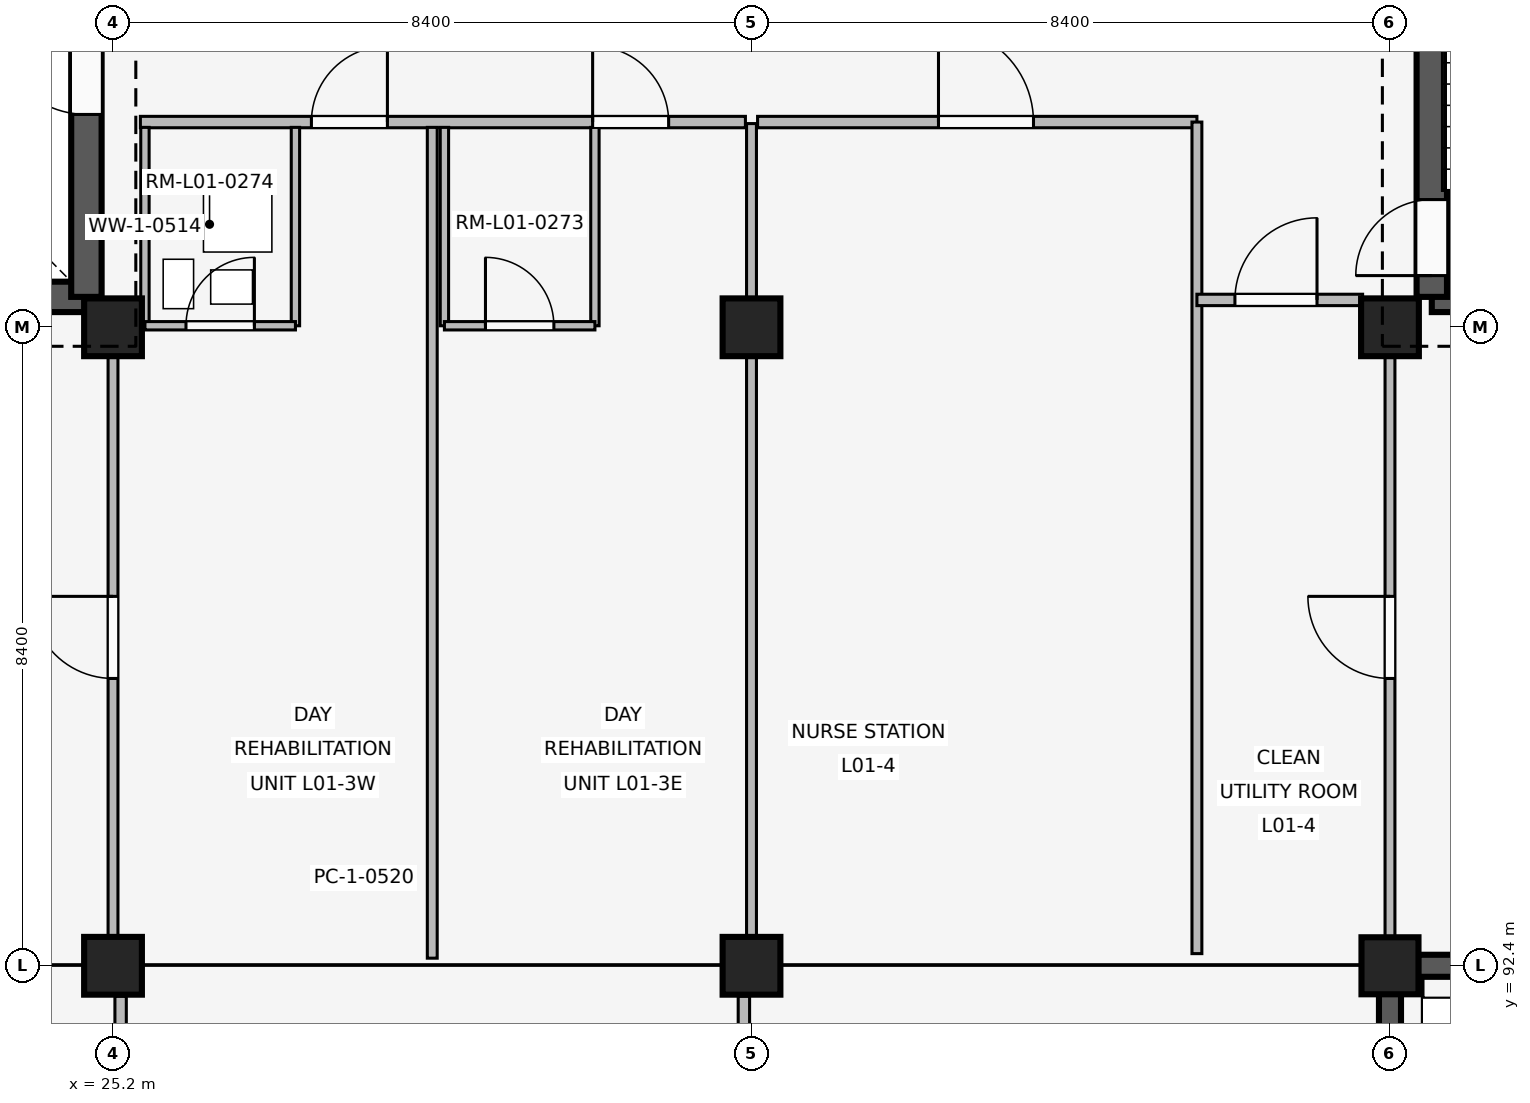
"""IFC4 building model, lengths in metres.
Left out: names, types, materials, properties, quantities, classifications, styles, units other than length and angle.
Written with IfcOpenShell. Run it as: python <this file> out.ifc"""

import sys

from ifc_helpers import new_model, si_unit, direction, frame, frame_2d, origin, origin_2d, place, context, subcontext, project, spatial, rectangle, extrude, element, fill, save


model = new_model("IFC4")
c1 = context("Model", 3, precision=1e-05, world=origin(), true_north=direction((0.0, 1.0)))
c2 = subcontext(c1, "Body", "Model", "MODEL_VIEW")
j1 = project(units=[si_unit("LENGTHUNIT", "METRE"), si_unit("PLANEANGLEUNIT", "RADIAN")], contexts=[c1])
p1 = place(None, origin())
s1 = spatial("IfcSite", under=j1, at=p1, CompositionType="ELEMENT")
p2 = place(p1, origin())
s2 = spatial("IfcBuilding", under=s1, at=p2, CompositionType="ELEMENT")
p3 = place(p2, frame((0.0, 0.0, 4.8)))
s3 = spatial("IfcBuildingStorey", under=s2, at=p3, CompositionType="ELEMENT", Elevation=4.8)
for number, where, z_axis, x_axis in (
    (1, (25.2, 92.4, 0.0), (0.0, 0.0, 1.0), (1.0, 0.0, 0.0)),
    (2, (25.2, 100.8, 0.0), (0.0, 0.0, 1.0), (1.0, 0.0, 0.0)),
    (3, (33.6, 92.4, 0.0), (0.0, 0.0, 1.0), (1.0, 0.0, 0.0)),
    (4, (33.6, 100.8, 0.0), (0.0, 0.0, 1.0), (1.0, 0.0, 0.0)),
):
    element("IfcColumn", number, at=place(p3, frame(where, z_axis=z_axis, x_axis=x_axis)), inside=s3, PredefinedType="COLUMN", context=c2, shape_type="SweptSolid", body=[
        extrude(rectangle(XDim=0.76, YDim=0.76, at=origin_2d()), origin(), (0.0, 0.0, 1.0), 3.3),
    ])
p4 = place(p3, frame((42.0, 92.4, 0.0), z_axis=(0.0, 0.0, 1.0), x_axis=(1.0, 0.0, 0.0)))
e5 = element("IfcColumn", 5, at=p4, inside=s3, PredefinedType="COLUMN", context=c2, shape_type="SweptSolid", body=[
    extrude(rectangle(XDim=0.75, YDim=0.75, at=origin_2d()), origin(), (0.0, 0.0, 1.0), 3.3),
])
p5 = place(p3, frame((42.0, 100.8, 0.0), z_axis=(0.0, 0.0, 1.0), x_axis=(1.0, 0.0, 0.0)))
e6 = element("IfcColumn", 6, at=p5, inside=s3, PredefinedType="COLUMN", context=c2, shape_type="SweptSolid", body=[
    extrude(rectangle(XDim=0.76, YDim=0.76, at=origin_2d()), origin(), (0.0, 0.0, 1.0), 3.3),
])
p6 = place(p3, frame((42.0, 92.03, 0.0), z_axis=(0.0, 0.0, 1.0), x_axis=(0.0, -1.0, 0.0)))
e7 = element("IfcWall", 7, at=p6, inside=s3, PredefinedType="SOLIDWALL", context=c2, shape_type="SweptSolid", body=[
    extrude(rectangle(XDim=7.66, YDim=0.29, at=frame_2d((3.83, 0.0))), origin(), (0.0, 0.0, 1.0), 2.42),
])
p7 = place(p6, frame((0.952, 0.0, 0.85)))
e8 = element("IfcOpeningElement", 8, at=p7, cuts=e7, PredefinedType="OPENING", context=c2, shape_type="SweptSolid", body=[
    extrude(rectangle(XDim=1.62, YDim=0.95, at=frame_2d((0.81, 0.475))), frame((0.0, 0.155, 0.0), z_axis=(0.0, -1.0, 0.0), x_axis=(1.0, 0.0, 0.0)), (0.0, 0.0, 1.0), 0.31),
])
p8 = place(p6, frame((5.088, 0.0, 0.85)))
e9 = element("IfcOpeningElement", 9, at=p8, cuts=e7, PredefinedType="OPENING", context=c2, shape_type="SweptSolid", body=[
    extrude(rectangle(XDim=1.62, YDim=0.95, at=frame_2d((0.81, 0.475))), frame((0.0, 0.155, 0.0), z_axis=(0.0, -1.0, 0.0), x_axis=(1.0, 0.0, 0.0)), (0.0, 0.0, 1.0), 0.31),
])
p9 = place(p3, frame((50.03, 92.4, 0.0), z_axis=(0.0, 0.0, 1.0), x_axis=(-1.0, 0.0, 0.0)))
e10 = element("IfcWall", 10, at=p9, inside=s3, PredefinedType="SOLIDWALL", context=c2, shape_type="SweptSolid", body=[
    extrude(rectangle(XDim=7.66, YDim=0.29, at=frame_2d((3.83, 0.0))), origin(), (0.0, 0.0, 1.0), 2.42),
])
p10 = place(p9, frame((0.952, 0.0, 0.85)))
e11 = element("IfcOpeningElement", 11, at=p10, cuts=e10, PredefinedType="OPENING", context=c2, shape_type="SweptSolid", body=[
    extrude(rectangle(XDim=1.62, YDim=0.95, at=frame_2d((0.81, 0.475))), frame((0.0, 0.155, 0.0), z_axis=(0.0, -1.0, 0.0), x_axis=(1.0, 0.0, 0.0)), (0.0, 0.0, 1.0), 0.31),
])
p11 = place(p9, frame((5.088, 0.0, 0.85)))
e12 = element("IfcOpeningElement", 12, at=p11, cuts=e10, PredefinedType="OPENING", context=c2, shape_type="SweptSolid", body=[
    extrude(rectangle(XDim=1.62, YDim=0.95, at=frame_2d((0.81, 0.475))), frame((0.0, 0.155, 0.0), z_axis=(0.0, -1.0, 0.0), x_axis=(1.0, 0.0, 0.0)), (0.0, 0.0, 1.0), 0.31),
])
p12 = place(p3, frame((42.55, 101.2, 0.0), z_axis=(0.0, 0.0, 1.0), x_axis=(1.0, 0.0, 0.0)))
e13 = element("IfcWall", 13, at=p12, inside=s3, PredefinedType="SHEAR", context=c2, shape_type="SweptSolid", body=[
    extrude(rectangle(XDim=7.5, YDim=0.4, at=frame_2d((3.75, 0.0))), origin(), (0.0, 0.0, 1.0), 3.02),
])
p13 = place(p12, frame((4.85, 0.0, 0.0)))
e14 = element("IfcOpeningElement", 14, at=p13, cuts=e13, PredefinedType="OPENING", context=c2, shape_type="SweptSolid", body=[
    extrude(rectangle(XDim=1.2, YDim=2.1, at=frame_2d((0.6, 1.05))), frame((0.0, 0.21, 0.0), z_axis=(0.0, -1.0, 0.0), x_axis=(1.0, 0.0, 0.0)), (0.0, 0.0, 1.0), 0.42),
])
p14 = place(p3, frame((42.55, 101.2, 0.0), z_axis=(0.0, 0.0, 1.0), x_axis=(0.0, 1.0, 0.0)))
e15 = element("IfcWall", 15, at=p14, inside=s3, PredefinedType="SHEAR", context=c2, shape_type="SweptSolid", body=[
    extrude(rectangle(XDim=7.55, YDim=0.4, at=frame_2d((3.775, 0.0))), origin(), (0.0, 0.0, 1.0), 3.02),
])
p15 = place(p14, frame((0.28, 0.0, 0.0)))
e16 = element("IfcOpeningElement", 16, at=p15, cuts=e15, PredefinedType="OPENING", context=c2, shape_type="SweptSolid", body=[
    extrude(rectangle(XDim=1.0, YDim=2.15, at=frame_2d((0.5, 1.075))), frame((0.0, 0.21, 0.0), z_axis=(0.0, -1.0, 0.0), x_axis=(1.0, 0.0, 0.0)), (0.0, 0.0, 1.0), 0.42),
])
p16 = place(p3, frame((17.35, 101.2, 0.0), z_axis=(0.0, 0.0, 1.0), x_axis=(1.0, 0.0, 0.0)))
e17 = element("IfcWall", 17, at=p16, inside=s3, PredefinedType="SHEAR", context=c2, shape_type="SweptSolid", body=[
    extrude(rectangle(XDim=7.5, YDim=0.4, at=frame_2d((3.75, 0.0))), origin(), (0.0, 0.0, 1.0), 3.02),
])
p17 = place(p16, frame((4.85, 0.0, 0.0)))
e18 = element("IfcOpeningElement", 18, at=p17, cuts=e17, PredefinedType="OPENING", context=c2, shape_type="SweptSolid", body=[
    extrude(rectangle(XDim=1.2, YDim=2.1, at=frame_2d((0.6, 1.05))), frame((0.0, 0.21, 0.0), z_axis=(0.0, -1.0, 0.0), x_axis=(1.0, 0.0, 0.0)), (0.0, 0.0, 1.0), 0.42),
])
p18 = place(p3, frame((24.85, 101.2, 0.0), z_axis=(0.0, 0.0, 1.0), x_axis=(0.0, 1.0, 0.0)))
e19 = element("IfcWall", 19, at=p18, inside=s3, PredefinedType="SHEAR", context=c2, shape_type="SweptSolid", body=[
    extrude(rectangle(XDim=7.55, YDim=0.4, at=frame_2d((3.775, 0.0))), origin(), (0.0, 0.0, 1.0), 3.02),
])
p19 = place(p18, frame((2.4, 0.0, 0.0)))
e20 = element("IfcOpeningElement", 20, at=p19, cuts=e19, PredefinedType="OPENING", context=c2, shape_type="SweptSolid", body=[
    extrude(rectangle(XDim=1.2, YDim=2.2, at=frame_2d((0.6, 1.1))), frame((0.0, 0.21, 0.0), z_axis=(0.0, -1.0, 0.0), x_axis=(1.0, 0.0, 0.0)), (0.0, 0.0, 1.0), 0.42),
])
p20 = place(p3, frame((25.2, 92.54, 0.0), z_axis=(0.0, 0.0, 1.0), x_axis=(0.0, 1.0, 0.0)))
e21 = element("IfcWall", 21, at=p20, inside=s3, PredefinedType="PARTITIONING", context=c2, shape_type="SweptSolid", body=[
    extrude(rectangle(XDim=8.21, YDim=0.13, at=frame_2d((4.105, 0.0))), origin(), (0.0, 0.0, 1.0), 2.4),
])
p21 = place(p20, frame((3.64, 0.0, 0.0)))
e22 = element("IfcOpeningElement", 22, at=p21, cuts=e21, PredefinedType="OPENING", context=c2, shape_type="SweptSolid", body=[
    extrude(rectangle(XDim=1.08, YDim=2.15, at=frame_2d((0.54, 1.075))), frame((0.0, 0.075, 0.0), z_axis=(0.0, -1.0, 0.0), x_axis=(1.0, 0.0, 0.0)), (0.0, 0.0, 1.0), 0.15),
])
p22 = place(p3, frame((25.56, 103.5, 0.0), z_axis=(0.0, 0.0, 1.0), x_axis=(1.0, 0.0, 0.0)))
e23 = element("IfcWall", 23, at=p22, inside=s3, PredefinedType="PARTITIONING", context=c2, shape_type="SweptSolid", body=[
    extrude(rectangle(XDim=7.96, YDim=0.15, at=frame_2d((3.98, 0.0))), origin(), (0.0, 0.0, 1.0), 2.4),
])
p23 = place(p22, frame((2.25, 0.0, 0.0)))
e24 = element("IfcOpeningElement", 24, at=p23, cuts=e23, PredefinedType="OPENING", context=c2, shape_type="SweptSolid", body=[
    extrude(rectangle(XDim=1.0, YDim=2.15, at=frame_2d((0.5, 1.075))), frame((0.0, 0.085, 0.0), z_axis=(0.0, -1.0, 0.0), x_axis=(1.0, 0.0, 0.0)), (0.0, 0.0, 1.0), 0.17),
])
p24 = place(p22, frame((5.95, 0.0, 0.0)))
e25 = element("IfcOpeningElement", 25, at=p24, cuts=e23, PredefinedType="OPENING", context=c2, shape_type="SweptSolid", body=[
    extrude(rectangle(XDim=1.0, YDim=2.15, at=frame_2d((0.5, 1.075))), frame((0.0, 0.085, 0.0), z_axis=(0.0, -1.0, 0.0), x_axis=(1.0, 0.0, 0.0)), (0.0, 0.0, 1.0), 0.17),
])
p25 = place(p3, frame((29.4, 92.5, 0.0), z_axis=(0.0, 0.0, 1.0), x_axis=(0.0, 1.0, 0.0)))
e26 = element("IfcWall", 26, at=p25, inside=s3, PredefinedType="PARTITIONING", context=c2, shape_type="SweptSolid", body=[
    extrude(rectangle(XDim=10.93, YDim=0.13, at=frame_2d((5.465, 0.0))), origin(), (0.0, 0.0, 1.0), 2.4),
])
for number, where, z_axis, x_axis in (
    (27, (25.62, 100.82, 0.0), (0.0, 0.0, 1.0), (0.0, 1.0, 0.0)),
    (28, (27.6, 100.82, 0.0), (0.0, 0.0, 1.0), (0.0, 1.0, 0.0)),
):
    element("IfcWall", number, at=place(p3, frame(where, z_axis=z_axis, x_axis=x_axis)), inside=s3, PredefinedType="PARTITIONING", context=c2, shape_type="SweptSolid", body=[
        extrude(rectangle(XDim=2.61, YDim=0.11, at=frame_2d((1.305, 0.0))), origin(), (0.0, 0.0, 1.0), 2.4),
    ])
p26 = place(p3, frame((25.62, 100.82, 0.0), z_axis=(0.0, 0.0, 1.0), x_axis=(1.0, 0.0, 0.0)))
e29 = element("IfcWall", 29, at=p26, inside=s3, PredefinedType="PARTITIONING", context=c2, shape_type="SweptSolid", body=[
    extrude(rectangle(XDim=1.98, YDim=0.11, at=frame_2d((0.99, 0.0))), origin(), (0.0, 0.0, 1.0), 2.4),
])
p27 = place(p26, frame((0.54, 0.0, 0.0)))
e30 = element("IfcOpeningElement", 30, at=p27, cuts=e29, PredefinedType="OPENING", context=c2, shape_type="SweptSolid", body=[
    extrude(rectangle(XDim=0.9, YDim=2.1, at=frame_2d((0.45, 1.05))), frame((0.0, 0.065, 0.0), z_axis=(0.0, -1.0, 0.0), x_axis=(1.0, 0.0, 0.0)), (0.0, 0.0, 1.0), 0.13),
])
for number, where, z_axis, x_axis in (
    (31, (29.56, 100.82, 0.0), (0.0, 0.0, 1.0), (0.0, 1.0, 0.0)),
    (32, (31.54, 100.82, 0.0), (0.0, 0.0, 1.0), (0.0, 1.0, 0.0)),
):
    element("IfcWall", number, at=place(p3, frame(where, z_axis=z_axis, x_axis=x_axis)), inside=s3, PredefinedType="PARTITIONING", context=c2, shape_type="SweptSolid", body=[
        extrude(rectangle(XDim=2.61, YDim=0.11, at=frame_2d((1.305, 0.0))), origin(), (0.0, 0.0, 1.0), 2.4),
    ])
p28 = place(p3, frame((29.56, 100.82, 0.0), z_axis=(0.0, 0.0, 1.0), x_axis=(1.0, 0.0, 0.0)))
e33 = element("IfcWall", 33, at=p28, inside=s3, PredefinedType="PARTITIONING", context=c2, shape_type="SweptSolid", body=[
    extrude(rectangle(XDim=1.98, YDim=0.11, at=frame_2d((0.99, 0.0))), origin(), (0.0, 0.0, 1.0), 2.4),
])
p29 = place(p28, frame((0.54, 0.0, 0.0)))
e34 = element("IfcOpeningElement", 34, at=p29, cuts=e33, PredefinedType="OPENING", context=c2, shape_type="SweptSolid", body=[
    extrude(rectangle(XDim=0.9, YDim=2.1, at=frame_2d((0.45, 1.05))), frame((0.0, 0.065, 0.0), z_axis=(0.0, -1.0, 0.0), x_axis=(1.0, 0.0, 0.0)), (0.0, 0.0, 1.0), 0.13),
])
p30 = place(p3, frame((28.05, 93.55, 0.0), z_axis=(0.0, 0.0, 1.0), x_axis=(1.0, 0.0, 0.0)))
e35 = element("IfcWall", 35, at=p30, inside=s3, PredefinedType="PLUMBINGWALL", context=c2, shape_type="SweptSolid", body=[
    extrude(rectangle(XDim=0.9, YDim=0.24, at=frame_2d((0.45, 0.0))), origin(), (0.0, 0.0, 1.0), 2.4),
])
p31 = place(p3, frame((33.6, 92.54, 0.0), z_axis=(0.0, 0.0, 1.0), x_axis=(0.0, 1.0, 0.0)))
e36 = element("IfcWall", 36, at=p31, inside=s3, PredefinedType="PARTITIONING", context=c2, shape_type="SweptSolid", body=[
    extrude(rectangle(XDim=10.94, YDim=0.13, at=frame_2d((5.47, 0.0))), origin(), (0.0, 0.0, 1.0), 2.4),
])
p32 = place(p3, frame((33.68, 103.5, 0.0), z_axis=(0.0, 0.0, 1.0), x_axis=(1.0, 0.0, 0.0)))
e37 = element("IfcWall", 37, at=p32, inside=s3, PredefinedType="PARTITIONING", context=c2, shape_type="SweptSolid", body=[
    extrude(rectangle(XDim=5.78, YDim=0.15, at=frame_2d((2.89, 0.0))), origin(), (0.0, 0.0, 1.0), 2.4),
])
p33 = place(p32, frame((2.38, 0.0, 0.0)))
e38 = element("IfcOpeningElement", 38, at=p33, cuts=e37, PredefinedType="OPENING", context=c2, shape_type="SweptSolid", body=[
    extrude(rectangle(XDim=1.25, YDim=2.2, at=frame_2d((0.625, 1.1))), frame((0.0, 0.085, 0.0), z_axis=(0.0, -1.0, 0.0), x_axis=(1.0, 0.0, 0.0)), (0.0, 0.0, 1.0), 0.17),
])
p34 = place(p3, frame((39.46, 92.56, 0.0), z_axis=(0.0, 0.0, 1.0), x_axis=(0.0, 1.0, 0.0)))
e39 = element("IfcWall", 39, at=p34, inside=s3, PredefinedType="PARTITIONING", context=c2, shape_type="SweptSolid", body=[
    extrude(rectangle(XDim=10.94, YDim=0.13, at=frame_2d((5.47, 0.0))), origin(), (0.0, 0.0, 1.0), 2.4),
])
p35 = place(p3, frame((39.46, 101.16, 0.0), z_axis=(0.0, 0.0, 1.0), x_axis=(1.0, 0.0, 0.0)))
e40 = element("IfcWall", 40, at=p35, inside=s3, PredefinedType="PARTITIONING", context=c2, shape_type="SweptSolid", body=[
    extrude(rectangle(XDim=2.18, YDim=0.15, at=frame_2d((1.09, 0.0))), origin(), (0.0, 0.0, 1.0), 2.4),
])
p36 = place(p35, frame((0.5, 0.0, 0.0)))
e41 = element("IfcOpeningElement", 41, at=p36, cuts=e40, PredefinedType="OPENING", context=c2, shape_type="SweptSolid", body=[
    extrude(rectangle(XDim=1.08, YDim=2.15, at=frame_2d((0.54, 1.075))), frame((0.0, 0.085, 0.0), z_axis=(0.0, -1.0, 0.0), x_axis=(1.0, 0.0, 0.0)), (0.0, 0.0, 1.0), 0.17),
])
p37 = place(p3, frame((42.0, 92.54, 0.0), z_axis=(0.0, 0.0, 1.0), x_axis=(0.0, 1.0, 0.0)))
e42 = element("IfcWall", 42, at=p37, inside=s3, PredefinedType="PARTITIONING", context=c2, shape_type="SweptSolid", body=[
    extrude(rectangle(XDim=8.21, YDim=0.13, at=frame_2d((4.105, 0.0))), origin(), (0.0, 0.0, 1.0), 2.4),
])
p38 = place(p37, frame((3.64, 0.0, 0.0)))
e43 = element("IfcOpeningElement", 43, at=p38, cuts=e42, PredefinedType="OPENING", context=c2, shape_type="SweptSolid", body=[
    extrude(rectangle(XDim=1.08, YDim=2.15, at=frame_2d((0.54, 1.075))), frame((0.0, 0.075, 0.0), z_axis=(0.0, -1.0, 0.0), x_axis=(1.0, 0.0, 0.0)), (0.0, 0.0, 1.0), 0.15),
])
p39 = place(p3, frame((25.3, 76.0, 0.0), z_axis=(0.0, 0.0, 1.0), x_axis=(0.0, 1.0, 0.0)))
e44 = element("IfcWall", 44, at=p39, inside=s3, PredefinedType="PARTITIONING", context=c2, shape_type="SweptSolid", body=[
    extrude(rectangle(XDim=16.0, YDim=0.15, at=frame_2d((8.0, 0.0))), origin(), (0.0, 0.0, 1.0), 2.4),
])
p40 = place(p39, frame((3.4, 0.0, 0.0)))
e45 = element("IfcOpeningElement", 45, at=p40, cuts=e44, PredefinedType="OPENING", context=c2, shape_type="SweptSolid", body=[
    extrude(rectangle(XDim=1.4, YDim=2.25, at=frame_2d((0.7, 1.125))), frame((0.0, 0.085, 0.0), z_axis=(0.0, -1.0, 0.0), x_axis=(1.0, 0.0, 0.0)), (0.0, 0.0, 1.0), 0.17),
])
p41 = place(p3, frame((33.5, 25.6, 0.0), z_axis=(0.0, 0.0, 1.0), x_axis=(0.0, 1.0, 0.0)))
e46 = element("IfcWall", 46, at=p41, inside=s3, PredefinedType="PARTITIONING", context=c2, shape_type="SweptSolid", body=[
    extrude(rectangle(XDim=66.4, YDim=0.15, at=frame_2d((33.2, 0.0))), origin(), (0.0, 0.0, 1.0), 2.4),
])
p42 = place(p41, frame((3.4, 0.0, 0.0)))
e47 = element("IfcOpeningElement", 47, at=p42, cuts=e46, PredefinedType="OPENING", context=c2, shape_type="SweptSolid", body=[
    extrude(rectangle(XDim=0.98, YDim=2.05, at=frame_2d((0.49, 1.025))), frame((0.0, 0.085, 0.0), z_axis=(0.0, -1.0, 0.0), x_axis=(1.0, 0.0, 0.0)), (0.0, 0.0, 1.0), 0.17),
])
p43 = place(p15, origin())
e48 = element("IfcDoor", 48, at=p43, inside=s3, OperationType="SINGLE_SWING_LEFT", PredefinedType="DOOR", context=c2, shape_type="SweptSolid", body=[
    extrude(rectangle(XDim=1.0, YDim=2.15, at=frame_2d((0.5, 1.075))), frame((0.0, 0.025, 0.0), z_axis=(0.0, -1.0, 0.0), x_axis=(1.0, 0.0, 0.0)), (0.0, 0.0, 1.0), 0.05),
])
fill(e16, e48)
p44 = place(p19, origin())
e49 = element("IfcDoor", 49, at=p44, inside=s3, OperationType="SINGLE_SWING_RIGHT", PredefinedType="DOOR", context=c2, shape_type="SweptSolid", body=[
    extrude(rectangle(XDim=1.2, YDim=2.2, at=frame_2d((0.6, 1.1))), frame((0.0, 0.025, 0.0), z_axis=(0.0, -1.0, 0.0), x_axis=(1.0, 0.0, 0.0)), (0.0, 0.0, 1.0), 0.05),
])
fill(e20, e49)
p45 = place(p21, origin())
e50 = element("IfcDoor", 50, at=p45, inside=s3, OperationType="SINGLE_SWING_RIGHT", PredefinedType="DOOR", context=c2, shape_type="SweptSolid", body=[
    extrude(rectangle(XDim=1.08, YDim=2.15, at=frame_2d((0.54, 1.075))), frame((0.0, 0.025, 0.0), z_axis=(0.0, -1.0, 0.0), x_axis=(1.0, 0.0, 0.0)), (0.0, 0.0, 1.0), 0.05),
])
fill(e22, e50)
p46 = place(p23, origin())
e51 = element("IfcDoor", 51, at=p46, inside=s3, OperationType="SINGLE_SWING_RIGHT", PredefinedType="DOOR", context=c2, shape_type="SweptSolid", body=[
    extrude(rectangle(XDim=1.0, YDim=2.15, at=frame_2d((0.5, 1.075))), frame((0.0, 0.025, 0.0), z_axis=(0.0, -1.0, 0.0), x_axis=(1.0, 0.0, 0.0)), (0.0, 0.0, 1.0), 0.05),
])
fill(e24, e51)
p47 = place(p24, origin())
e52 = element("IfcDoor", 52, at=p47, inside=s3, OperationType="SINGLE_SWING_LEFT", PredefinedType="DOOR", context=c2, shape_type="SweptSolid", body=[
    extrude(rectangle(XDim=1.0, YDim=2.15, at=frame_2d((0.5, 1.075))), frame((0.0, 0.025, 0.0), z_axis=(0.0, -1.0, 0.0), x_axis=(1.0, 0.0, 0.0)), (0.0, 0.0, 1.0), 0.05),
])
fill(e25, e52)
p48 = place(p27, origin())
e53 = element("IfcDoor", 53, at=p48, inside=s3, OperationType="SINGLE_SWING_RIGHT", PredefinedType="DOOR", context=c2, shape_type="SweptSolid", body=[
    extrude(rectangle(XDim=0.9, YDim=2.1, at=frame_2d((0.45, 1.05))), frame((0.0, 0.025, 0.0), z_axis=(0.0, -1.0, 0.0), x_axis=(1.0, 0.0, 0.0)), (0.0, 0.0, 1.0), 0.05),
])
fill(e30, e53)
p49 = place(p29, origin())
e54 = element("IfcDoor", 54, at=p49, inside=s3, OperationType="SINGLE_SWING_LEFT", PredefinedType="DOOR", context=c2, shape_type="SweptSolid", body=[
    extrude(rectangle(XDim=0.9, YDim=2.1, at=frame_2d((0.45, 1.05))), frame((0.0, 0.025, 0.0), z_axis=(0.0, -1.0, 0.0), x_axis=(1.0, 0.0, 0.0)), (0.0, 0.0, 1.0), 0.05),
])
fill(e34, e54)
p50 = place(p33, origin())
e55 = element("IfcDoor", 55, at=p50, inside=s3, OperationType="SINGLE_SWING_LEFT", PredefinedType="DOOR", context=c2, shape_type="SweptSolid", body=[
    extrude(rectangle(XDim=1.25, YDim=2.2, at=frame_2d((0.625, 1.1))), frame((0.0, 0.025, 0.0), z_axis=(0.0, -1.0, 0.0), x_axis=(1.0, 0.0, 0.0)), (0.0, 0.0, 1.0), 0.05),
])
fill(e38, e55)
p51 = place(p36, origin())
e56 = element("IfcDoor", 56, at=p51, inside=s3, OperationType="SINGLE_SWING_RIGHT", PredefinedType="DOOR", context=c2, shape_type="SweptSolid", body=[
    extrude(rectangle(XDim=1.08, YDim=2.15, at=frame_2d((0.54, 1.075))), frame((0.0, 0.025, 0.0), z_axis=(0.0, -1.0, 0.0), x_axis=(1.0, 0.0, 0.0)), (0.0, 0.0, 1.0), 0.05),
])
fill(e41, e56)
p52 = place(p38, origin())
e57 = element("IfcDoor", 57, at=p52, inside=s3, OperationType="SINGLE_SWING_RIGHT", PredefinedType="DOOR", context=c2, shape_type="SweptSolid", body=[
    extrude(rectangle(XDim=1.08, YDim=2.15, at=frame_2d((0.54, 1.075))), frame((0.0, 0.025, 0.0), z_axis=(0.0, -1.0, 0.0), x_axis=(1.0, 0.0, 0.0)), (0.0, 0.0, 1.0), 0.05),
])
fill(e43, e57)
save(model, sys.argv[1])
